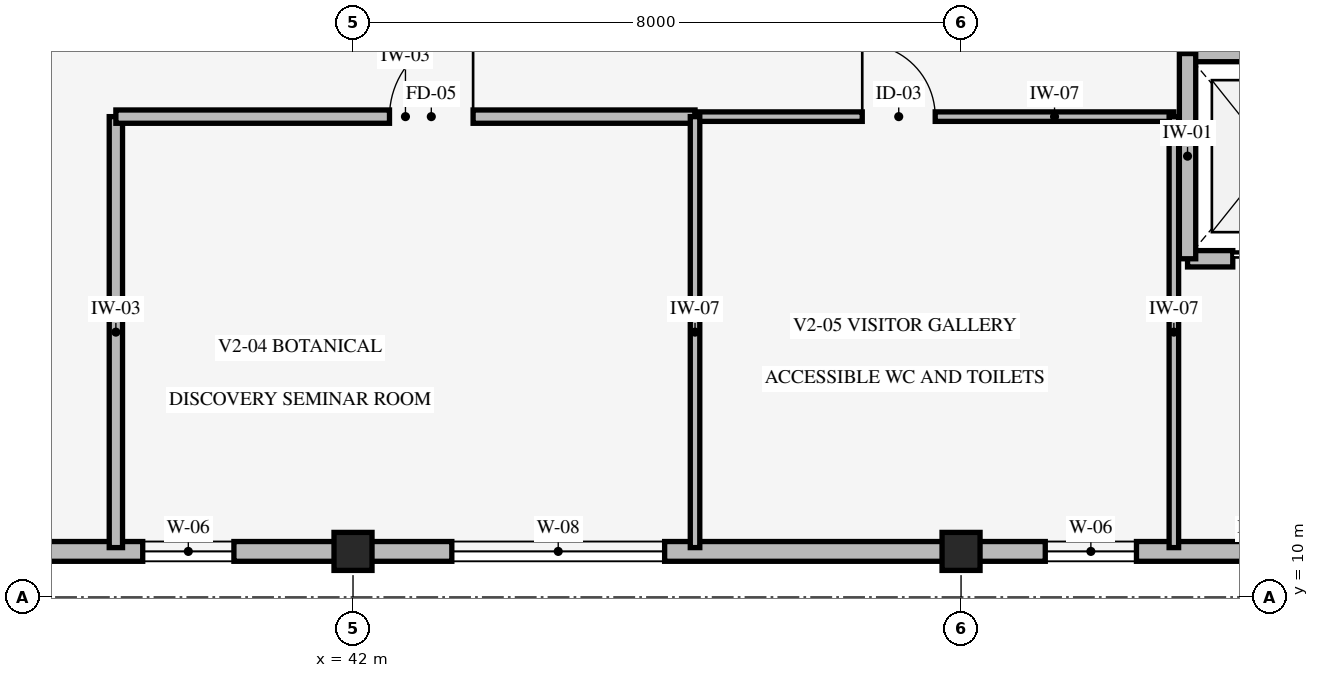
"""IFC4 building model, lengths in metres.
Left out: names, types, materials, properties, quantities, classifications, styles, units other than length and angle.
Written with IfcOpenShell. Run it as: python <this file> out.ifc"""

import sys

from ifc_helpers import new_model, si_unit, direction, frame, frame_2d, origin, origin_2d, place, context, subcontext, project, spatial, rectangle, extrude, element, fill, save


model = new_model("IFC4")
c1 = context("Model", 3, precision=1e-05, world=origin(), true_north=direction((0.0, 1.0)))
c2 = subcontext(c1, "Body", "Model", "MODEL_VIEW")
j1 = project(units=[si_unit("LENGTHUNIT", "METRE"), si_unit("PLANEANGLEUNIT", "RADIAN")], contexts=[c1])
p1 = place(None, origin())
s1 = spatial("IfcSite", under=j1, at=p1, CompositionType="ELEMENT")
p2 = place(p1, origin())
s2 = spatial("IfcBuilding", under=s1, at=p2, CompositionType="ELEMENT")
p3 = place(p2, frame((0.0, 0.0, 5.4)))
s3 = spatial("IfcBuildingStorey", under=s2, at=p3, CompositionType="ELEMENT", Elevation=5.4)
for number, where, z_axis, x_axis in (
    (1, (42.0, 10.6, 0.0), (0.0, 0.0, 1.0), (1.0, 0.0, 0.0)),
    (2, (50.0, 10.6, 0.0), (0.0, 0.0, 1.0), (1.0, 0.0, 0.0)),
):
    element("IfcColumn", number, at=place(p3, frame(where, z_axis=z_axis, x_axis=x_axis)), inside=s3, PredefinedType="COLUMN", context=c2, shape_type="SweptSolid", body=[
        extrude(rectangle(XDim=0.5, YDim=0.5, at=origin_2d()), origin(), (0.0, 0.0, 1.0), 4.8),
    ])
p4 = place(p3, frame((58.0, 10.6, 0.0), z_axis=(0.0, 0.0, 1.0), x_axis=(-1.0, 0.0, 0.0)))
e3 = element("IfcWall", 3, at=p4, inside=s3, PredefinedType="STANDARD", context=c2, shape_type="SweptSolid", body=[
    extrude(rectangle(XDim=8.0, YDim=0.26, at=frame_2d((4.0, 0.0))), origin(), (0.0, 0.0, 1.0), 3.94),
])
p5 = place(p4, frame((5.692, 0.0, 0.85)))
e4 = element("IfcOpeningElement", 4, at=p5, cuts=e3, PredefinedType="OPENING", context=c2, shape_type="SweptSolid", body=[
    extrude(rectangle(XDim=1.2, YDim=1.2, at=frame_2d((0.6, 0.6))), frame((0.0, 0.14, 0.0), z_axis=(0.0, -1.0, 0.0), x_axis=(1.0, 0.0, 0.0)), (0.0, 0.0, 1.0), 0.28),
])
p6 = place(p3, frame((50.0, 10.6, 0.0), z_axis=(0.0, 0.0, 1.0), x_axis=(-1.0, 0.0, 0.0)))
e5 = element("IfcWall", 5, at=p6, inside=s3, PredefinedType="STANDARD", context=c2, shape_type="SweptSolid", body=[
    extrude(rectangle(XDim=8.0, YDim=0.26, at=frame_2d((4.0, 0.0))), origin(), (0.0, 0.0, 1.0), 3.94),
])
p7 = place(p6, frame((3.9, 0.0, 0.85)))
e6 = element("IfcOpeningElement", 6, at=p7, cuts=e5, PredefinedType="OPENING", context=c2, shape_type="SweptSolid", body=[
    extrude(rectangle(XDim=2.8, YDim=1.6, at=frame_2d((1.4, 0.8))), frame((0.0, 0.14, 0.0), z_axis=(0.0, -1.0, 0.0), x_axis=(1.0, 0.0, 0.0)), (0.0, 0.0, 1.0), 0.28),
])
p8 = place(p3, frame((42.0, 10.6, 0.0), z_axis=(0.0, 0.0, 1.0), x_axis=(-1.0, 0.0, 0.0)))
e7 = element("IfcWall", 7, at=p8, inside=s3, PredefinedType="STANDARD", context=c2, shape_type="SweptSolid", body=[
    extrude(rectangle(XDim=8.0, YDim=0.26, at=frame_2d((4.0, 0.0))), origin(), (0.0, 0.0, 1.0), 3.94),
])
p9 = place(p8, frame((1.567, 0.0, 0.85)))
e8 = element("IfcOpeningElement", 8, at=p9, cuts=e7, PredefinedType="OPENING", context=c2, shape_type="SweptSolid", body=[
    extrude(rectangle(XDim=1.2, YDim=1.2, at=frame_2d((0.6, 0.6))), frame((0.0, 0.14, 0.0), z_axis=(0.0, -1.0, 0.0), x_axis=(1.0, 0.0, 0.0)), (0.0, 0.0, 1.0), 0.28),
])
p10 = place(p3, frame((52.98, 14.45, 0.0), z_axis=(0.0, 0.0, 1.0), x_axis=(1.0, 0.0, 0.0)))
e9 = element("IfcWall", 9, at=p10, inside=s3, PredefinedType="STANDARD", context=c2, shape_type="SweptSolid", body=[
    extrude(rectangle(XDim=2.24, YDim=0.215, at=frame_2d((1.12, 0.0))), origin(), (0.0, 0.0, 1.0), 4.5),
])
p11 = place(p10, frame((0.595, 0.0, 0.0)))
e10 = element("IfcOpeningElement", 10, at=p11, cuts=e9, PredefinedType="OPENING", context=c2, shape_type="SweptSolid", body=[
    extrude(rectangle(XDim=1.05, YDim=2.2, at=frame_2d((0.525, 1.1))), frame((0.0, 0.118, 0.0), z_axis=(0.0, -1.0, 0.0), x_axis=(1.0, 0.0, 0.0)), (0.0, 0.0, 1.0), 0.235),
])
p12 = place(p3, frame((55.22, 17.15, 0.0), z_axis=(0.0, 0.0, 1.0), x_axis=(-1.0, 0.0, 0.0)))
e11 = element("IfcWall", 11, at=p12, inside=s3, PredefinedType="STANDARD", context=c2, shape_type="SweptSolid", body=[
    extrude(rectangle(XDim=2.24, YDim=0.215, at=frame_2d((1.12, 0.0))), origin(), (0.0, 0.0, 1.0), 4.5),
])
p13 = place(p3, frame((52.98, 17.15, 0.0), z_axis=(0.0, 0.0, 1.0), x_axis=(0.0, -1.0, 0.0)))
e12 = element("IfcWall", 12, at=p13, inside=s3, PredefinedType="STANDARD", context=c2, shape_type="SweptSolid", body=[
    extrude(rectangle(XDim=2.7, YDim=0.215, at=frame_2d((1.35, 0.0))), origin(), (0.0, 0.0, 1.0), 4.5),
])
p14 = place(p3, frame((38.88, 10.65, 0.0), z_axis=(0.0, 0.0, 1.0), x_axis=(0.0, 1.0, 0.0)))
e13 = element("IfcWall", 13, at=p14, inside=s3, PredefinedType="STANDARD", context=c2, shape_type="SweptSolid", body=[
    extrude(rectangle(XDim=5.67, YDim=0.175, at=frame_2d((2.835, 0.0))), origin(), (0.0, 0.0, 1.0), 4.5),
])
p15 = place(p3, frame((38.88, 16.32, 0.0), z_axis=(0.0, 0.0, 1.0), x_axis=(1.0, 0.0, 0.0)))
e14 = element("IfcWall", 14, at=p15, inside=s3, PredefinedType="STANDARD", context=c2, shape_type="SweptSolid", body=[
    extrude(rectangle(XDim=7.62, YDim=0.175, at=frame_2d((3.81, 0.0))), origin(), (0.0, 0.0, 1.0), 4.5),
])
p16 = place(p15, frame((3.6, 0.0, 0.0)))
e15 = element("IfcOpeningElement", 15, at=p16, cuts=e14, PredefinedType="OPENING", context=c2, shape_type="SweptSolid", body=[
    extrude(rectangle(XDim=1.1, YDim=2.1, at=frame_2d((0.55, 1.05))), frame((0.0, 0.098, 0.0), z_axis=(0.0, -1.0, 0.0), x_axis=(1.0, 0.0, 0.0)), (0.0, 0.0, 1.0), 0.195),
])
p17 = place(p3, frame((46.5, 16.32, 0.0), z_axis=(0.0, 0.0, 1.0), x_axis=(1.0, 0.0, 0.0)))
e16 = element("IfcWall", 16, at=p17, inside=s3, PredefinedType="STANDARD", context=c2, shape_type="SweptSolid", body=[
    extrude(rectangle(XDim=6.3, YDim=0.125, at=frame_2d((3.15, 0.0))), origin(), (0.0, 0.0, 1.0), 4.5),
])
p18 = place(p17, frame((2.2, 0.0, 0.0)))
e17 = element("IfcOpeningElement", 17, at=p18, cuts=e16, PredefinedType="OPENING", context=c2, shape_type="SweptSolid", body=[
    extrude(rectangle(XDim=0.96, YDim=2.08, at=frame_2d((0.48, 1.04))), frame((0.0, 0.073, 0.0), z_axis=(0.0, -1.0, 0.0), x_axis=(1.0, 0.0, 0.0)), (0.0, 0.0, 1.0), 0.145),
])
p19 = place(p3, frame((46.5, 10.65, 0.0), z_axis=(0.0, 0.0, 1.0), x_axis=(0.0, 1.0, 0.0)))
e18 = element("IfcWall", 18, at=p19, inside=s3, PredefinedType="STANDARD", context=c2, shape_type="SweptSolid", body=[
    extrude(rectangle(XDim=5.67, YDim=0.125, at=frame_2d((2.835, 0.0))), origin(), (0.0, 0.0, 1.0), 4.19),
])
p20 = place(p3, frame((52.8, 10.65, 0.0), z_axis=(0.0, 0.0, 1.0), x_axis=(0.0, 1.0, 0.0)))
e19 = element("IfcWall", 19, at=p20, inside=s3, PredefinedType="STANDARD", context=c2, shape_type="SweptSolid", body=[
    extrude(rectangle(XDim=5.67, YDim=0.125, at=frame_2d((2.835, 0.0))), origin(), (0.0, 0.0, 1.0), 4.5),
])
p21 = place(p5, origin())
e20 = element("IfcWindow", 20, at=p21, inside=s3, PartitioningType="SINGLE_PANEL", PredefinedType="WINDOW", context=c2, shape_type="SweptSolid", body=[
    extrude(rectangle(XDim=1.2, YDim=1.2, at=frame_2d((0.6, 0.6))), frame((0.0, 0.03, 0.0), z_axis=(0.0, -1.0, 0.0), x_axis=(1.0, 0.0, 0.0)), (0.0, 0.0, 1.0), 0.06),
])
fill(e4, e20)
p22 = place(p7, origin())
e21 = element("IfcWindow", 21, at=p22, inside=s3, PartitioningType="SINGLE_PANEL", PredefinedType="WINDOW", context=c2, shape_type="SweptSolid", body=[
    extrude(rectangle(XDim=2.8, YDim=1.6, at=frame_2d((1.4, 0.8))), frame((0.0, 0.03, 0.0), z_axis=(0.0, -1.0, 0.0), x_axis=(1.0, 0.0, 0.0)), (0.0, 0.0, 1.0), 0.06),
])
fill(e6, e21)
p23 = place(p9, origin())
e22 = element("IfcWindow", 22, at=p23, inside=s3, PartitioningType="SINGLE_PANEL", PredefinedType="WINDOW", context=c2, shape_type="SweptSolid", body=[
    extrude(rectangle(XDim=1.2, YDim=1.2, at=frame_2d((0.6, 0.6))), frame((0.0, 0.03, 0.0), z_axis=(0.0, -1.0, 0.0), x_axis=(1.0, 0.0, 0.0)), (0.0, 0.0, 1.0), 0.06),
])
fill(e8, e22)
p24 = place(p11, origin())
e23 = element("IfcDoor", 23, at=p24, inside=s3, OperationType="SLIDING_TO_RIGHT", PredefinedType="DOOR", context=c2, shape_type="SweptSolid", body=[
    extrude(rectangle(XDim=1.05, YDim=2.2, at=frame_2d((0.525, 1.1))), frame((0.0, 0.025, 0.0), z_axis=(0.0, -1.0, 0.0), x_axis=(1.0, 0.0, 0.0)), (0.0, 0.0, 1.0), 0.05),
])
fill(e10, e23)
p25 = place(p16, origin())
e24 = element("IfcDoor", 24, at=p25, inside=s3, OperationType="SINGLE_SWING_RIGHT", PredefinedType="DOOR", context=c2, shape_type="SweptSolid", body=[
    extrude(rectangle(XDim=1.1, YDim=2.1, at=frame_2d((0.55, 1.05))), frame((0.0, 0.025, 0.0), z_axis=(0.0, -1.0, 0.0), x_axis=(1.0, 0.0, 0.0)), (0.0, 0.0, 1.0), 0.05),
])
fill(e15, e24)
p26 = place(p18, origin())
e25 = element("IfcDoor", 25, at=p26, inside=s3, OperationType="SINGLE_SWING_LEFT", PredefinedType="DOOR", context=c2, shape_type="SweptSolid", body=[
    extrude(rectangle(XDim=0.96, YDim=2.08, at=frame_2d((0.48, 1.04))), frame((0.0, 0.025, 0.0), z_axis=(0.0, -1.0, 0.0), x_axis=(1.0, 0.0, 0.0)), (0.0, 0.0, 1.0), 0.05),
])
fill(e17, e25)
save(model, sys.argv[1])
